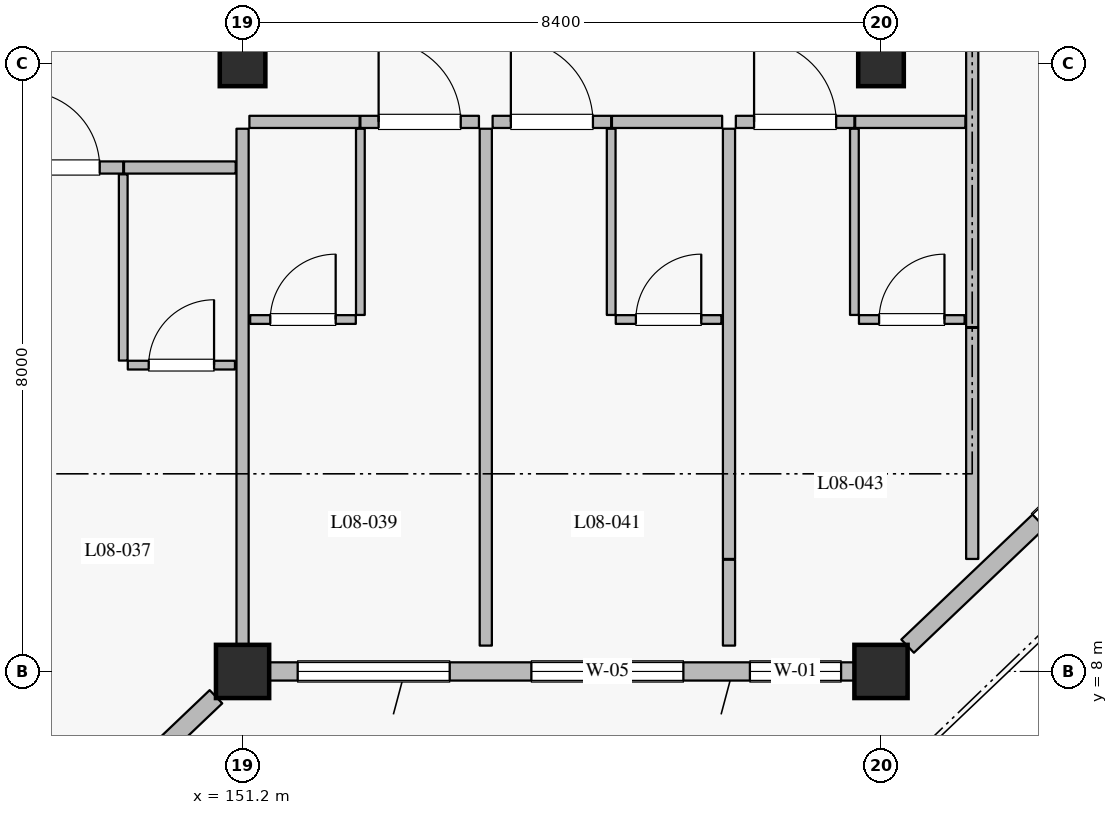
"""IFC4 building model, lengths in metres.
Left out: names, types, materials, properties, quantities, classifications, styles, units other than length and angle.
Written with IfcOpenShell. Run it as: python <this file> out.ifc"""

import sys

from ifc_helpers import new_model, si_unit, direction, frame, frame_2d, origin, origin_2d, place, context, subcontext, project, spatial, rectangle, extrude, element, fill, save


model = new_model("IFC4")
c1 = context("Model", 3, precision=1e-05, world=origin(), true_north=direction((0.0, 1.0)))
c2 = subcontext(c1, "Body", "Model", "MODEL_VIEW")
j1 = project(units=[si_unit("LENGTHUNIT", "METRE"), si_unit("PLANEANGLEUNIT", "RADIAN")], contexts=[c1])
p1 = place(None, origin())
s1 = spatial("IfcSite", under=j1, at=p1, CompositionType="ELEMENT")
p2 = place(p1, origin())
s2 = spatial("IfcBuilding", under=s1, at=p2, CompositionType="ELEMENT")
p3 = place(p2, frame((0.0, 0.0, 36.0)))
s3 = spatial("IfcBuildingStorey", under=s2, at=p3, CompositionType="ELEMENT", Elevation=36.0)
for number, where, z_axis, x_axis in (
    (1, (151.2, 8.0, 0.0), (0.0, 0.0, 1.0), (1.0, 0.0, 0.0)),
    (2, (159.6, 8.0, 0.0), (0.0, 0.0, 1.0), (1.0, 0.0, 0.0)),
):
    element("IfcColumn", number, at=place(p3, frame(where, z_axis=z_axis, x_axis=x_axis)), inside=s3, PredefinedType="COLUMN", context=c2, shape_type="SweptSolid", body=[
        extrude(rectangle(XDim=0.7, YDim=0.7, at=origin_2d()), origin(), (0.0, 0.0, 1.0), 3.6),
    ])
for number, where, z_axis, x_axis in (
    (3, (151.2, 16.0, 0.0), (0.0, 0.0, 1.0), (1.0, 0.0, 0.0)),
    (4, (159.6, 16.0, 0.0), (0.0, 0.0, 1.0), (1.0, 0.0, 0.0)),
):
    element("IfcColumn", number, at=place(p3, frame(where, z_axis=z_axis, x_axis=x_axis)), inside=s3, PredefinedType="COLUMN", context=c2, shape_type="SweptSolid", body=[
        extrude(rectangle(XDim=0.6, YDim=0.6, at=origin_2d()), origin(), (0.0, 0.0, 1.0), 3.6),
    ])
p4 = place(p3, frame((150.85, 7.667, 0.0), z_axis=(0.0, 0.0, 1.0), x_axis=(-0.724116091282, -0.689678103427, 0.0)))
e5 = element("IfcWall", 5, at=p4, inside=s3, PredefinedType="SOLIDWALL", context=c2, shape_type="SweptSolid", body=[
    extrude(rectangle(XDim=10.634, YDim=0.24, at=frame_2d((5.317, 0.0))), origin(), (0.0, 0.0, 1.0), 2.94),
])
p5 = place(p4, frame((1.204, 0.0, 0.0)))
e6 = element("IfcOpeningElement", 6, at=p5, cuts=e5, PredefinedType="OPENING", context=c2, shape_type="SweptSolid", body=[
    extrude(rectangle(XDim=1.5, YDim=2.25, at=frame_2d((0.75, 1.125))), frame((0.0, 0.13, 0.0), z_axis=(0.0, -1.0, 0.0), x_axis=(1.0, 0.0, 0.0)), (0.0, 0.0, 1.0), 0.26),
])
p6 = place(p4, frame((5.511, 0.0, 0.8)))
e7 = element("IfcOpeningElement", 7, at=p6, cuts=e5, PredefinedType="OPENING", context=c2, shape_type="SweptSolid", body=[
    extrude(rectangle(XDim=1.6, YDim=1.6, at=frame_2d((0.8, 0.8))), frame((0.0, 0.13, 0.0), z_axis=(0.0, -1.0, 0.0), x_axis=(1.0, 0.0, 0.0)), (0.0, 0.0, 1.0), 0.26),
])
p7 = place(p4, frame((8.874, 0.0, 0.8)))
e8 = element("IfcOpeningElement", 8, at=p7, cuts=e5, PredefinedType="OPENING", context=c2, shape_type="SweptSolid", body=[
    extrude(rectangle(XDim=1.6, YDim=1.6, at=frame_2d((0.8, 0.8))), frame((0.0, 0.13, 0.0), z_axis=(0.0, -1.0, 0.0), x_axis=(1.0, 0.0, 0.0)), (0.0, 0.0, 1.0), 0.26),
])
p8 = place(p3, frame((159.25, 8.0, 0.0), z_axis=(0.0, 0.0, 1.0), x_axis=(-1.0, 0.0, 0.0)))
e9 = element("IfcWall", 9, at=p8, inside=s3, PredefinedType="SOLIDWALL", context=c2, shape_type="SweptSolid", body=[
    extrude(rectangle(XDim=7.7, YDim=0.24, at=frame_2d((3.85, 0.0))), origin(), (0.0, 0.0, 1.0), 2.94),
])
p9 = place(p8, frame((0.175, 0.0, 0.8)))
e10 = element("IfcOpeningElement", 10, at=p9, cuts=e9, PredefinedType="OPENING", context=c2, shape_type="SweptSolid", body=[
    extrude(rectangle(XDim=1.2, YDim=1.5, at=frame_2d((0.6, 0.75))), frame((0.0, 0.13, 0.0), z_axis=(0.0, -1.0, 0.0), x_axis=(1.0, 0.0, 0.0)), (0.0, 0.0, 1.0), 0.26),
])
p10 = place(p8, frame((2.25, 0.0, 0.8)))
e11 = element("IfcOpeningElement", 11, at=p10, cuts=e9, PredefinedType="OPENING", context=c2, shape_type="SweptSolid", body=[
    extrude(rectangle(XDim=2.0, YDim=1.75, at=frame_2d((1.0, 0.875))), frame((0.0, 0.13, 0.0), z_axis=(0.0, -1.0, 0.0), x_axis=(1.0, 0.0, 0.0)), (0.0, 0.0, 1.0), 0.26),
])
p11 = place(p8, frame((5.325, 0.0, 0.8)))
e12 = element("IfcOpeningElement", 12, at=p11, cuts=e9, PredefinedType="OPENING", context=c2, shape_type="SweptSolid", body=[
    extrude(rectangle(XDim=2.0, YDim=1.75, at=frame_2d((1.0, 0.875))), frame((0.0, 0.13, 0.0), z_axis=(0.0, -1.0, 0.0), x_axis=(1.0, 0.0, 0.0)), (0.0, 0.0, 1.0), 0.26),
])
p12 = place(p3, frame((167.65, 15.667, 0.0), z_axis=(0.0, 0.0, 1.0), x_axis=(-0.724105170588, -0.689689569247, 0.0)))
e13 = element("IfcWall", 13, at=p12, inside=s3, PredefinedType="SOLIDWALL", context=c2, shape_type="SweptSolid", body=[
    extrude(rectangle(XDim=10.634, YDim=0.24, at=frame_2d((5.317, 0.0))), origin(), (0.0, 0.0, 1.0), 2.94),
])
p13 = place(p12, frame((2.081, 0.0, 0.0)))
e14 = element("IfcOpeningElement", 14, at=p13, cuts=e13, PredefinedType="OPENING", context=c2, shape_type="SweptSolid", body=[
    extrude(rectangle(XDim=1.5, YDim=2.25, at=frame_2d((0.75, 1.125))), frame((0.0, 0.13, 0.0), z_axis=(0.0, -1.0, 0.0), x_axis=(1.0, 0.0, 0.0)), (0.0, 0.0, 1.0), 0.26),
])
p14 = place(p12, frame((6.25, 0.0, 0.8)))
e15 = element("IfcOpeningElement", 15, at=p14, cuts=e13, PredefinedType="OPENING", context=c2, shape_type="SweptSolid", body=[
    extrude(rectangle(XDim=2.0, YDim=1.75, at=frame_2d((1.0, 0.875))), frame((0.0, 0.13, 0.0), z_axis=(0.0, -1.0, 0.0), x_axis=(1.0, 0.0, 0.0)), (0.0, 0.0, 1.0), 0.26),
])
p15 = place(p3, frame((148.01, 14.63, 0.0), z_axis=(0.0, 0.0, 1.0), x_axis=(1.0, 0.0, 0.0)))
e16 = element("IfcWall", 16, at=p15, inside=s3, PredefinedType="PARTITIONING", context=c2, shape_type="SweptSolid", body=[
    extrude(rectangle(XDim=1.62, YDim=0.16, at=frame_2d((0.81, 0.0))), origin(), (0.0, 0.0, 1.0), 3.365),
])
p16 = place(p15, frame((0.31, 0.0, 0.0)))
e17 = element("IfcOpeningElement", 17, at=p16, cuts=e16, PredefinedType="OPENING", context=c2, shape_type="SweptSolid", body=[
    extrude(rectangle(XDim=1.0, YDim=2.25, at=frame_2d((0.5, 1.125))), frame((0.0, 0.09, 0.0), z_axis=(0.0, -1.0, 0.0), x_axis=(1.0, 0.0, 0.0)), (0.0, 0.0, 1.0), 0.18),
])
p17 = place(p3, frame((149.64, 14.63, 0.0), z_axis=(0.0, 0.0, 1.0), x_axis=(1.0, 0.0, 0.0)))
e18 = element("IfcWall", 18, at=p17, inside=s3, PredefinedType="PARTITIONING", context=c2, shape_type="SweptSolid", body=[
    extrude(rectangle(XDim=1.47, YDim=0.16, at=frame_2d((0.735, 0.0))), origin(), (0.0, 0.0, 1.0), 3.365),
])
p18 = place(p3, frame((149.63, 12.09, 0.0), z_axis=(0.0, 0.0, 1.0), x_axis=(0.0, 1.0, 0.0)))
e19 = element("IfcWall", 19, at=p18, inside=s3, PredefinedType="PARTITIONING", context=c2, shape_type="SweptSolid", body=[
    extrude(rectangle(XDim=2.45, YDim=0.115, at=frame_2d((1.225, 0.0))), origin(), (0.0, 0.0, 1.0), 3.365),
])
p19 = place(p3, frame((149.69, 12.03, 0.0), z_axis=(0.0, 0.0, 1.0), x_axis=(1.0, 0.0, 0.0)))
e20 = element("IfcWall", 20, at=p19, inside=s3, PredefinedType="PARTITIONING", context=c2, shape_type="SweptSolid", body=[
    extrude(rectangle(XDim=1.41, YDim=0.115, at=frame_2d((0.705, 0.0))), origin(), (0.0, 0.0, 1.0), 3.365),
])
p20 = place(p19, frame((0.275, 0.0, 0.0)))
e21 = element("IfcOpeningElement", 21, at=p20, cuts=e20, PredefinedType="OPENING", context=c2, shape_type="SweptSolid", body=[
    extrude(rectangle(XDim=0.86, YDim=2.12, at=frame_2d((0.43, 1.06))), frame((0.0, 0.067, 0.0), z_axis=(0.0, -1.0, 0.0), x_axis=(1.0, 0.0, 0.0)), (0.0, 0.0, 1.0), 0.135),
])
p21 = place(p3, frame((151.29, 15.23, 0.0), z_axis=(0.0, 0.0, 1.0), x_axis=(1.0, 0.0, 0.0)))
e22 = element("IfcWall", 22, at=p21, inside=s3, PredefinedType="PARTITIONING", context=c2, shape_type="SweptSolid", body=[
    extrude(rectangle(XDim=1.45, YDim=0.16, at=frame_2d((0.725, 0.0))), origin(), (0.0, 0.0, 1.0), 3.365),
])
p22 = place(p3, frame((152.75, 15.23, 0.0), z_axis=(0.0, 0.0, 1.0), x_axis=(1.0, 0.0, 0.0)))
e23 = element("IfcWall", 23, at=p22, inside=s3, PredefinedType="PARTITIONING", context=c2, shape_type="SweptSolid", body=[
    extrude(rectangle(XDim=1.56, YDim=0.16, at=frame_2d((0.78, 0.0))), origin(), (0.0, 0.0, 1.0), 3.365),
])
p23 = place(p22, frame((0.24, 0.0, 0.0)))
e24 = element("IfcOpeningElement", 24, at=p23, cuts=e23, PredefinedType="OPENING", context=c2, shape_type="SweptSolid", body=[
    extrude(rectangle(XDim=1.08, YDim=2.3, at=frame_2d((0.54, 1.15))), frame((0.0, 0.09, 0.0), z_axis=(0.0, -1.0, 0.0), x_axis=(1.0, 0.0, 0.0)), (0.0, 0.0, 1.0), 0.18),
])
p24 = place(p3, frame((152.75, 12.69, 0.0), z_axis=(0.0, 0.0, 1.0), x_axis=(0.0, 1.0, 0.0)))
e25 = element("IfcWall", 25, at=p24, inside=s3, PredefinedType="PARTITIONING", context=c2, shape_type="SweptSolid", body=[
    extrude(rectangle(XDim=2.45, YDim=0.115, at=frame_2d((1.225, 0.0))), origin(), (0.0, 0.0, 1.0), 3.365),
])
p25 = place(p3, frame((151.3, 12.63, 0.0), z_axis=(0.0, 0.0, 1.0), x_axis=(1.0, 0.0, 0.0)))
e26 = element("IfcWall", 26, at=p25, inside=s3, PredefinedType="PARTITIONING", context=c2, shape_type="SweptSolid", body=[
    extrude(rectangle(XDim=1.39, YDim=0.115, at=frame_2d((0.695, 0.0))), origin(), (0.0, 0.0, 1.0), 3.365),
])
p26 = place(p25, frame((0.265, 0.0, 0.0)))
e27 = element("IfcOpeningElement", 27, at=p26, cuts=e26, PredefinedType="OPENING", context=c2, shape_type="SweptSolid", body=[
    extrude(rectangle(XDim=0.86, YDim=2.12, at=frame_2d((0.43, 1.06))), frame((0.0, 0.067, 0.0), z_axis=(0.0, -1.0, 0.0), x_axis=(1.0, 0.0, 0.0)), (0.0, 0.0, 1.0), 0.135),
])
p27 = place(p3, frame((151.2, 8.34, 0.0), z_axis=(0.0, 0.0, 1.0), x_axis=(0.0, 1.0, 0.0)))
e28 = element("IfcWall", 28, at=p27, inside=s3, PredefinedType="PARTITIONING", context=c2, shape_type="SweptSolid", body=[
    extrude(rectangle(XDim=6.8, YDim=0.16, at=frame_2d((3.4, 0.0))), origin(), (0.0, 0.0, 1.0), 2.74),
])
p28 = place(p3, frame((154.49, 15.23, 0.0), z_axis=(0.0, 0.0, 1.0), x_axis=(1.0, 0.0, 0.0)))
e29 = element("IfcWall", 29, at=p28, inside=s3, PredefinedType="PARTITIONING", context=c2, shape_type="SweptSolid", body=[
    extrude(rectangle(XDim=1.56, YDim=0.16, at=frame_2d((0.78, 0.0))), origin(), (0.0, 0.0, 1.0), 3.365),
])
p29 = place(p28, frame((0.24, 0.0, 0.0)))
e30 = element("IfcOpeningElement", 30, at=p29, cuts=e29, PredefinedType="OPENING", context=c2, shape_type="SweptSolid", body=[
    extrude(rectangle(XDim=1.08, YDim=2.3, at=frame_2d((0.54, 1.15))), frame((0.0, 0.09, 0.0), z_axis=(0.0, -1.0, 0.0), x_axis=(1.0, 0.0, 0.0)), (0.0, 0.0, 1.0), 0.18),
])
p30 = place(p3, frame((156.06, 15.23, 0.0), z_axis=(0.0, 0.0, 1.0), x_axis=(1.0, 0.0, 0.0)))
e31 = element("IfcWall", 31, at=p30, inside=s3, PredefinedType="PARTITIONING", context=c2, shape_type="SweptSolid", body=[
    extrude(rectangle(XDim=1.45, YDim=0.16, at=frame_2d((0.725, 0.0))), origin(), (0.0, 0.0, 1.0), 3.365),
])
p31 = place(p3, frame((156.05, 12.69, 0.0), z_axis=(0.0, 0.0, 1.0), x_axis=(0.0, 1.0, 0.0)))
e32 = element("IfcWall", 32, at=p31, inside=s3, PredefinedType="PARTITIONING", context=c2, shape_type="SweptSolid", body=[
    extrude(rectangle(XDim=2.45, YDim=0.115, at=frame_2d((1.225, 0.0))), origin(), (0.0, 0.0, 1.0), 3.365),
])
p32 = place(p3, frame((156.11, 12.63, 0.0), z_axis=(0.0, 0.0, 1.0), x_axis=(1.0, 0.0, 0.0)))
e33 = element("IfcWall", 33, at=p32, inside=s3, PredefinedType="PARTITIONING", context=c2, shape_type="SweptSolid", body=[
    extrude(rectangle(XDim=1.39, YDim=0.115, at=frame_2d((0.695, 0.0))), origin(), (0.0, 0.0, 1.0), 3.365),
])
p33 = place(p32, frame((0.265, 0.0, 0.0)))
e34 = element("IfcOpeningElement", 34, at=p33, cuts=e33, PredefinedType="OPENING", context=c2, shape_type="SweptSolid", body=[
    extrude(rectangle(XDim=0.86, YDim=2.12, at=frame_2d((0.43, 1.06))), frame((0.0, 0.067, 0.0), z_axis=(0.0, -1.0, 0.0), x_axis=(1.0, 0.0, 0.0)), (0.0, 0.0, 1.0), 0.135),
])
p34 = place(p3, frame((154.4, 8.34, 0.0), z_axis=(0.0, 0.0, 1.0), x_axis=(0.0, 1.0, 0.0)))
e35 = element("IfcWall", 35, at=p34, inside=s3, PredefinedType="PARTITIONING", context=c2, shape_type="SweptSolid", body=[
    extrude(rectangle(XDim=6.8, YDim=0.16, at=frame_2d((3.4, 0.0))), origin(), (0.0, 0.0, 1.0), 3.365),
])
p35 = place(p3, frame((157.6, 8.34, 0.0), z_axis=(0.0, 0.0, 1.0), x_axis=(0.0, 1.0, 0.0)))
e36 = element("IfcWall", 36, at=p35, inside=s3, PredefinedType="PARTITIONING", context=c2, shape_type="SweptSolid", body=[
    extrude(rectangle(XDim=1.13, YDim=0.16, at=frame_2d((0.565, 0.0))), origin(), (0.0, 0.0, 1.0), 3.365),
])
p36 = place(p3, frame((157.69, 15.23, 0.0), z_axis=(0.0, 0.0, 1.0), x_axis=(1.0, 0.0, 0.0)))
e37 = element("IfcWall", 37, at=p36, inside=s3, PredefinedType="PARTITIONING", context=c2, shape_type="SweptSolid", body=[
    extrude(rectangle(XDim=1.56, YDim=0.16, at=frame_2d((0.78, 0.0))), origin(), (0.0, 0.0, 1.0), 3.365),
])
p37 = place(p36, frame((0.24, 0.0, 0.0)))
e38 = element("IfcOpeningElement", 38, at=p37, cuts=e37, PredefinedType="OPENING", context=c2, shape_type="SweptSolid", body=[
    extrude(rectangle(XDim=1.08, YDim=2.3, at=frame_2d((0.54, 1.15))), frame((0.0, 0.09, 0.0), z_axis=(0.0, -1.0, 0.0), x_axis=(1.0, 0.0, 0.0)), (0.0, 0.0, 1.0), 0.18),
])
p38 = place(p3, frame((159.26, 15.23, 0.0), z_axis=(0.0, 0.0, 1.0), x_axis=(1.0, 0.0, 0.0)))
e39 = element("IfcWall", 39, at=p38, inside=s3, PredefinedType="PARTITIONING", context=c2, shape_type="SweptSolid", body=[
    extrude(rectangle(XDim=1.45, YDim=0.16, at=frame_2d((0.725, 0.0))), origin(), (0.0, 0.0, 1.0), 3.365),
])
p39 = place(p3, frame((159.25, 12.69, 0.0), z_axis=(0.0, 0.0, 1.0), x_axis=(0.0, 1.0, 0.0)))
e40 = element("IfcWall", 40, at=p39, inside=s3, PredefinedType="PARTITIONING", context=c2, shape_type="SweptSolid", body=[
    extrude(rectangle(XDim=2.45, YDim=0.115, at=frame_2d((1.225, 0.0))), origin(), (0.0, 0.0, 1.0), 3.365),
])
p40 = place(p3, frame((159.31, 12.63, 0.0), z_axis=(0.0, 0.0, 1.0), x_axis=(1.0, 0.0, 0.0)))
e41 = element("IfcWall", 41, at=p40, inside=s3, PredefinedType="PARTITIONING", context=c2, shape_type="SweptSolid", body=[
    extrude(rectangle(XDim=1.39, YDim=0.115, at=frame_2d((0.695, 0.0))), origin(), (0.0, 0.0, 1.0), 3.365),
])
p41 = place(p40, frame((0.265, 0.0, 0.0)))
e42 = element("IfcOpeningElement", 42, at=p41, cuts=e41, PredefinedType="OPENING", context=c2, shape_type="SweptSolid", body=[
    extrude(rectangle(XDim=0.86, YDim=2.12, at=frame_2d((0.43, 1.06))), frame((0.0, 0.067, 0.0), z_axis=(0.0, -1.0, 0.0), x_axis=(1.0, 0.0, 0.0)), (0.0, 0.0, 1.0), 0.135),
])
p42 = place(p3, frame((157.6, 9.48, 0.0), z_axis=(0.0, 0.0, 1.0), x_axis=(0.0, 1.0, 0.0)))
e43 = element("IfcWall", 43, at=p42, inside=s3, PredefinedType="PARTITIONING", context=c2, shape_type="SweptSolid", body=[
    extrude(rectangle(XDim=5.66, YDim=0.16, at=frame_2d((2.83, 0.0))), origin(), (0.0, 0.0, 1.0), 3.365),
])
p43 = place(p3, frame((160.8, 9.48, 0.0), z_axis=(0.0, 0.0, 1.0), x_axis=(0.0, 1.0, 0.0)))
e44 = element("IfcWall", 44, at=p43, inside=s3, PredefinedType="PARTITIONING", context=c2, shape_type="SweptSolid", body=[
    extrude(rectangle(XDim=3.04, YDim=0.16, at=frame_2d((1.52, 0.0))), origin(), (0.0, 0.0, 1.0), 3.365),
])
p44 = place(p3, frame((160.8, 12.53, 0.0), z_axis=(0.0, 0.0, 1.0), x_axis=(0.0, 1.0, 0.0)))
e45 = element("IfcWall", 45, at=p44, inside=s3, PredefinedType="PARTITIONING", context=c2, shape_type="SweptSolid", body=[
    extrude(rectangle(XDim=9.55, YDim=0.16, at=frame_2d((4.775, 0.0))), origin(), (0.0, 0.0, 1.0), 3.365),
])
p45 = place(p9, origin())
e46 = element("IfcWindow", 46, at=p45, inside=s3, PartitioningType="SINGLE_PANEL", PredefinedType="WINDOW", context=c2, shape_type="SweptSolid", body=[
    extrude(rectangle(XDim=1.2, YDim=1.5, at=frame_2d((0.6, 0.75))), frame((0.0, 0.03, 0.0), z_axis=(0.0, -1.0, 0.0), x_axis=(1.0, 0.0, 0.0)), (0.0, 0.0, 1.0), 0.06),
])
fill(e10, e46)
p46 = place(p10, origin())
e47 = element("IfcWindow", 47, at=p46, inside=s3, PartitioningType="DOUBLE_PANEL_VERTICAL", PredefinedType="WINDOW", context=c2, shape_type="SweptSolid", body=[
    extrude(rectangle(XDim=2.0, YDim=1.75, at=frame_2d((1.0, 0.875))), frame((0.0, 0.03, 0.0), z_axis=(0.0, -1.0, 0.0), x_axis=(1.0, 0.0, 0.0)), (0.0, 0.0, 1.0), 0.06),
])
fill(e11, e47)
p47 = place(p11, origin())
e48 = element("IfcWindow", 48, at=p47, inside=s3, PartitioningType="DOUBLE_PANEL_VERTICAL", PredefinedType="WINDOW", context=c2, shape_type="SweptSolid", body=[
    extrude(rectangle(XDim=2.0, YDim=1.75, at=frame_2d((1.0, 0.875))), frame((0.0, 0.03, 0.0), z_axis=(0.0, -1.0, 0.0), x_axis=(1.0, 0.0, 0.0)), (0.0, 0.0, 1.0), 0.06),
])
fill(e12, e48)
p48 = place(p14, origin())
e49 = element("IfcWindow", 49, at=p48, inside=s3, PartitioningType="DOUBLE_PANEL_VERTICAL", PredefinedType="WINDOW", context=c2, shape_type="SweptSolid", body=[
    extrude(rectangle(XDim=2.0, YDim=1.75, at=frame_2d((1.0, 0.875))), frame((0.0, 0.03, 0.0), z_axis=(0.0, -1.0, 0.0), x_axis=(1.0, 0.0, 0.0)), (0.0, 0.0, 1.0), 0.06),
])
fill(e15, e49)
p49 = place(p16, origin())
e50 = element("IfcDoor", 50, at=p49, inside=s3, OperationType="SINGLE_SWING_LEFT", PredefinedType="DOOR", context=c2, shape_type="SweptSolid", body=[
    extrude(rectangle(XDim=1.0, YDim=2.25, at=frame_2d((0.5, 1.125))), frame((0.0, 0.025, 0.0), z_axis=(0.0, -1.0, 0.0), x_axis=(1.0, 0.0, 0.0)), (0.0, 0.0, 1.0), 0.05),
])
fill(e17, e50)
p50 = place(p20, origin())
e51 = element("IfcDoor", 51, at=p50, inside=s3, OperationType="SINGLE_SWING_RIGHT", PredefinedType="DOOR", context=c2, shape_type="SweptSolid", body=[
    extrude(rectangle(XDim=0.86, YDim=2.12, at=frame_2d((0.43, 1.06))), frame((0.0, 0.025, 0.0), z_axis=(0.0, -1.0, 0.0), x_axis=(1.0, 0.0, 0.0)), (0.0, 0.0, 1.0), 0.05),
])
fill(e21, e51)
p51 = place(p23, origin())
e52 = element("IfcDoor", 52, at=p51, inside=s3, OperationType="SINGLE_SWING_LEFT", PredefinedType="DOOR", context=c2, shape_type="SweptSolid", body=[
    extrude(rectangle(XDim=1.08, YDim=2.3, at=frame_2d((0.54, 1.15))), frame((0.0, 0.025, 0.0), z_axis=(0.0, -1.0, 0.0), x_axis=(1.0, 0.0, 0.0)), (0.0, 0.0, 1.0), 0.05),
])
fill(e24, e52)
p52 = place(p26, origin())
e53 = element("IfcDoor", 53, at=p52, inside=s3, OperationType="SINGLE_SWING_RIGHT", PredefinedType="DOOR", context=c2, shape_type="SweptSolid", body=[
    extrude(rectangle(XDim=0.86, YDim=2.12, at=frame_2d((0.43, 1.06))), frame((0.0, 0.025, 0.0), z_axis=(0.0, -1.0, 0.0), x_axis=(1.0, 0.0, 0.0)), (0.0, 0.0, 1.0), 0.05),
])
fill(e27, e53)
p53 = place(p29, origin())
e54 = element("IfcDoor", 54, at=p53, inside=s3, OperationType="SINGLE_SWING_LEFT", PredefinedType="DOOR", context=c2, shape_type="SweptSolid", body=[
    extrude(rectangle(XDim=1.08, YDim=2.3, at=frame_2d((0.54, 1.15))), frame((0.0, 0.025, 0.0), z_axis=(0.0, -1.0, 0.0), x_axis=(1.0, 0.0, 0.0)), (0.0, 0.0, 1.0), 0.05),
])
fill(e30, e54)
p54 = place(p33, origin())
e55 = element("IfcDoor", 55, at=p54, inside=s3, OperationType="SINGLE_SWING_RIGHT", PredefinedType="DOOR", context=c2, shape_type="SweptSolid", body=[
    extrude(rectangle(XDim=0.86, YDim=2.12, at=frame_2d((0.43, 1.06))), frame((0.0, 0.025, 0.0), z_axis=(0.0, -1.0, 0.0), x_axis=(1.0, 0.0, 0.0)), (0.0, 0.0, 1.0), 0.05),
])
fill(e34, e55)
p55 = place(p37, origin())
e56 = element("IfcDoor", 56, at=p55, inside=s3, OperationType="SINGLE_SWING_LEFT", PredefinedType="DOOR", context=c2, shape_type="SweptSolid", body=[
    extrude(rectangle(XDim=1.08, YDim=2.3, at=frame_2d((0.54, 1.15))), frame((0.0, 0.025, 0.0), z_axis=(0.0, -1.0, 0.0), x_axis=(1.0, 0.0, 0.0)), (0.0, 0.0, 1.0), 0.05),
])
fill(e38, e56)
p56 = place(p41, origin())
e57 = element("IfcDoor", 57, at=p56, inside=s3, OperationType="SINGLE_SWING_RIGHT", PredefinedType="DOOR", context=c2, shape_type="SweptSolid", body=[
    extrude(rectangle(XDim=0.86, YDim=2.12, at=frame_2d((0.43, 1.06))), frame((0.0, 0.025, 0.0), z_axis=(0.0, -1.0, 0.0), x_axis=(1.0, 0.0, 0.0)), (0.0, 0.0, 1.0), 0.05),
])
fill(e42, e57)
save(model, sys.argv[1])
